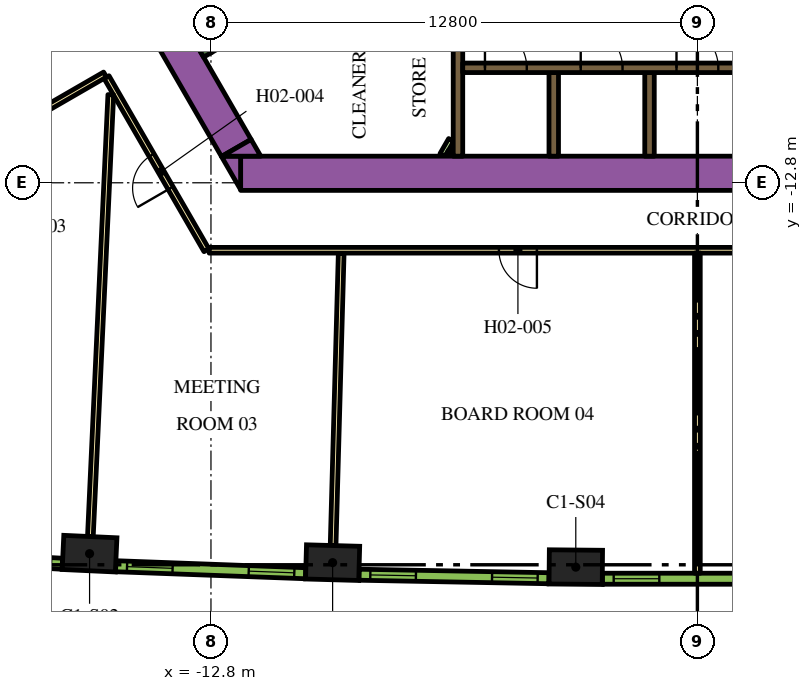
"""IFC4 building model, lengths in metres.
Left out: names, types, materials, properties, quantities, classifications, styles, units other than length and angle.
Written with IfcOpenShell. Run it as: python <this file> out.ifc"""

import sys

from ifc_helpers import new_model, si_unit, direction, frame, frame_2d, origin, origin_2d, place, context, subcontext, project, spatial, polyline, rectangle, outline, extrude, element, fill, save


model = new_model("IFC4")
c1 = context("Model", 3, precision=1e-05, world=origin(), true_north=direction((0.0, 1.0)))
c2 = subcontext(c1, "Body", "Model", "MODEL_VIEW")
j1 = project(units=[si_unit("LENGTHUNIT", "METRE"), si_unit("PLANEANGLEUNIT", "RADIAN")], contexts=[c1])
p1 = place(None, origin())
s1 = spatial("IfcSite", under=j1, at=p1, CompositionType="ELEMENT")
p2 = place(p1, origin())
s2 = spatial("IfcBuilding", under=s1, at=p2, CompositionType="ELEMENT")
p3 = place(p2, frame((0.0, 0.0, 43.2)))
s3 = spatial("IfcBuildingStorey", under=s2, at=p3, CompositionType="ELEMENT", Elevation=43.2)
for number, where, z_axis, x_axis in (
    (1, (-15.994, -22.558, 0.0), (0.0, 0.0, 1.0), (0.999, -0.046, 0.0)),
    (2, (-9.599, -22.795, 0.0), (0.0, 0.0, 1.0), (1.0, -0.028, 0.0)),
    (3, (-3.2, -22.913, 0.0), (0.0, 0.0, 1.0), (1.0, -0.009, 0.0)),
):
    element("IfcColumn", number, at=place(p3, frame(where, z_axis=z_axis, x_axis=x_axis)), inside=s3, PredefinedType="COLUMN", context=c2, shape_type="SweptSolid", body=[
        extrude(rectangle(XDim=1.4, YDim=0.9, at=origin_2d()), origin(), (0.0, 0.0, 1.0), 3.9),
    ])
p4 = place(p3, frame((-12.019, -12.55, 0.0), z_axis=(0.0, 0.0, 1.0), x_axis=(1.0, 0.0, 0.0)))
e4 = element("IfcWall", 4, at=p4, inside=s3, PredefinedType="SOLIDWALL", context=c2, shape_type="SweptSolid", body=[
    extrude(rectangle(XDim=22.083, YDim=0.9, at=frame_2d((11.042, 0.0))), origin(), (0.0, 0.0, 1.0), 3.9),
])
p5 = place(p3, origin())
e5 = element("IfcWall", 5, at=p5, inside=s3, PredefinedType="SOLIDWALL", context=c2, shape_type="SweptSolid", body=[
    extrude(outline(polyline([(-12.529, -12.1), (-12.021, -12.1), (-12.021, -12.98), (-12.529, -12.1)])), origin(), (0.0, 0.0, 1.0), 3.9),
])
p6 = place(p3, frame((-12.134, -11.883, 0.0), z_axis=(0.0, 0.0, 1.0), x_axis=(-0.500005339912, 0.866022320763, 0.0)))
e6 = element("IfcWall", 6, at=p6, inside=s3, PredefinedType="SOLIDWALL", context=c2, shape_type="SweptSolid", body=[
    extrude(rectangle(XDim=9.488, YDim=0.9, at=frame_2d((4.744, 0.0))), origin(), (0.0, 0.0, 1.0), 3.9),
])
e7 = element("IfcWall", 7, at=p5, inside=s3, PredefinedType="SOLIDWALL", context=c2, shape_type="SweptSolid", body=[
    extrude(outline(polyline([(-11.489, -12.1), (-12.505, -12.1), (-11.743, -11.66), (-11.489, -12.1)])), origin(), (0.0, 0.0, 1.0), 3.9),
])
p7 = place(p3, frame((-12.885, -9.431, 0.0), z_axis=(0.0, 0.0, 1.0), x_axis=(-0.500020560727, 0.866013532718, 0.0)))
e8 = element("IfcWall", 8, at=p7, inside=s3, PredefinedType="SOLIDWALL", context=c2, shape_type="SweptSolid", body=[
    extrude(rectangle(XDim=3.45, YDim=0.25, at=frame_2d((1.725, 0.0))), origin(), (0.0, 0.0, 1.0), 3.9),
])
p8 = place(p3, frame((-12.84, -9.261, 0.0), z_axis=(0.0, 0.0, 1.0), x_axis=(0.866016039709, 0.500016218704, 0.0)))
e9 = element("IfcWall", 9, at=p8, inside=s3, PredefinedType="SOLIDWALL", context=c2, shape_type="SweptSolid", body=[
    extrude(rectangle(XDim=7.05, YDim=0.25, at=frame_2d((3.525, 0.0))), origin(), (0.0, 0.0, 1.0), 3.9),
])
p9 = place(p3, frame((-3.78, -12.1, 0.0), z_axis=(0.0, 0.0, 1.0), x_axis=(0.0, 1.0, 0.0)))
e10 = element("IfcWall", 10, at=p9, inside=s3, PredefinedType="SOLIDWALL", context=c2, shape_type="SweptSolid", body=[
    extrude(rectangle(XDim=2.2, YDim=0.25, at=frame_2d((1.1, 0.0))), origin(), (0.0, 0.0, 1.0), 3.9),
])
p10 = place(p3, frame((-6.3, -12.1, 0.0), z_axis=(0.0, 0.0, 1.0), x_axis=(0.0, 1.0, 0.0)))
e11 = element("IfcWall", 11, at=p10, inside=s3, PredefinedType="SOLIDWALL", context=c2, shape_type="SweptSolid", body=[
    extrude(rectangle(XDim=3.146, YDim=0.25, at=frame_2d((1.573, 0.0))), origin(), (0.0, 0.0, 1.0), 3.9),
])
p11 = place(p3, frame((-1.26, -12.1, 0.0), z_axis=(0.0, 0.0, 1.0), x_axis=(0.0, 1.0, 0.0)))
e12 = element("IfcWall", 12, at=p11, inside=s3, PredefinedType="SOLIDWALL", context=c2, shape_type="SweptSolid", body=[
    extrude(rectangle(XDim=2.2, YDim=0.25, at=frame_2d((1.1, 0.0))), origin(), (0.0, 0.0, 1.0), 3.9),
])
p12 = place(p3, frame((-6.708, -12.068, 0.0), z_axis=(0.0, 0.0, 1.0), x_axis=(0.500000789788, 0.8660249478, 0.0)))
e13 = element("IfcWall", 13, at=p12, inside=s3, PredefinedType="PARTITIONING", context=c2, shape_type="SweptSolid", body=[
    extrude(rectangle(XDim=0.456, YDim=0.15, at=frame_2d((0.228, 0.0))), origin(), (0.0, 0.0, 1.0), 2.75),
])
p13 = place(p3, frame((-6.534, -12.068, 0.0), z_axis=(0.0, 0.0, 1.0), x_axis=(0.500240224089, 0.865886665912, 0.0)))
e14 = element("IfcWall", 14, at=p13, inside=s3, PredefinedType="PARTITIONING", context=c2, shape_type="SweptSolid", body=[
    extrude(rectangle(XDim=0.109, YDim=0.15, at=frame_2d((0.054, 0.0))), origin(), (0.0, 0.0, 1.0), 2.75),
])
p14 = place(p3, frame((-6.175, -9.775, 0.0), z_axis=(0.0, 0.0, 1.0), x_axis=(1.0, 0.0, 0.0)))
e15 = element("IfcWall", 15, at=p14, inside=s3, PredefinedType="SOLIDWALL", context=c2, shape_type="SweptSolid", body=[
    extrude(rectangle(XDim=12.35, YDim=0.25, at=frame_2d((6.175, 0.0))), origin(), (0.0, 0.0, 1.0), 3.9),
])
p15 = place(p14, frame((0.585, 0.0, 0.0)))
e16 = element("IfcOpeningElement", 16, at=p15, cuts=e15, PredefinedType="OPENING", context=c2, shape_type="SweptSolid", body=[
    extrude(rectangle(XDim=1.1, YDim=2.1, at=frame_2d((0.55, 1.05))), frame((0.0, 0.135, 0.0), z_axis=(0.0, -1.0, 0.0), x_axis=(1.0, 0.0, 0.0)), (0.0, 0.0, 1.0), 0.27),
])
p16 = place(p14, frame((3.105, 0.0, 0.0)))
e17 = element("IfcOpeningElement", 17, at=p16, cuts=e15, PredefinedType="OPENING", context=c2, shape_type="SweptSolid", body=[
    extrude(rectangle(XDim=1.1, YDim=2.1, at=frame_2d((0.55, 1.05))), frame((0.0, 0.135, 0.0), z_axis=(0.0, -1.0, 0.0), x_axis=(1.0, 0.0, 0.0)), (0.0, 0.0, 1.0), 0.27),
])
p17 = place(p14, frame((5.625, 0.0, 0.0)))
e18 = element("IfcOpeningElement", 18, at=p17, cuts=e15, PredefinedType="OPENING", context=c2, shape_type="SweptSolid", body=[
    extrude(rectangle(XDim=1.1, YDim=2.1, at=frame_2d((0.55, 1.05))), frame((0.0, 0.135, 0.0), z_axis=(0.0, -1.0, 0.0), x_axis=(1.0, 0.0, 0.0)), (0.0, 0.0, 1.0), 0.27),
])
p18 = place(p14, frame((8.145, 0.0, 0.0)))
e19 = element("IfcOpeningElement", 19, at=p18, cuts=e15, PredefinedType="OPENING", context=c2, shape_type="SweptSolid", body=[
    extrude(rectangle(XDim=1.1, YDim=2.1, at=frame_2d((0.55, 1.05))), frame((0.0, 0.135, 0.0), z_axis=(0.0, -1.0, 0.0), x_axis=(1.0, 0.0, 0.0)), (0.0, 0.0, 1.0), 0.27),
])
p19 = place(p14, frame((10.665, 0.0, 0.0)))
e20 = element("IfcOpeningElement", 20, at=p19, cuts=e15, PredefinedType="OPENING", context=c2, shape_type="SweptSolid", body=[
    extrude(rectangle(XDim=1.1, YDim=2.1, at=frame_2d((0.55, 1.05))), frame((0.0, 0.135, 0.0), z_axis=(0.0, -1.0, 0.0), x_axis=(1.0, 0.0, 0.0)), (0.0, 0.0, 1.0), 0.27),
])
p20 = place(p3, frame((-30.463, -16.635, 0.0), z_axis=(0.0, 0.0, 1.0), x_axis=(0.866022394896, 0.500005211512, 0.0)))
e21 = element("IfcWall", 21, at=p20, inside=s3, PredefinedType="PARTITIONING", context=c2, shape_type="SweptSolid", body=[
    extrude(rectangle(XDim=16.144, YDim=0.15, at=frame_2d((8.072, 0.0))), origin(), (0.0, 0.0, 1.0), 2.75),
])
p21 = place(p20, frame((13.948, 0.0, 0.0)))
e22 = element("IfcOpeningElement", 22, at=p21, cuts=e21, PredefinedType="OPENING", context=c2, shape_type="SweptSolid", body=[
    extrude(rectangle(XDim=0.9, YDim=2.1, at=frame_2d((0.45, 1.05))), frame((0.0, 0.085, 0.0), z_axis=(0.0, -1.0, 0.0), x_axis=(1.0, 0.0, 0.0)), (0.0, 0.0, 1.0), 0.17),
])
p22 = place(p20, frame((10.329, 0.0, 0.0)))
e23 = element("IfcOpeningElement", 23, at=p22, cuts=e21, PredefinedType="OPENING", context=c2, shape_type="SweptSolid", body=[
    extrude(rectangle(XDim=0.9, YDim=2.1, at=frame_2d((0.45, 1.05))), frame((0.0, 0.085, 0.0), z_axis=(0.0, -1.0, 0.0), x_axis=(1.0, 0.0, 0.0)), (0.0, 0.0, 1.0), 0.17),
])
p23 = place(p20, frame((7.274, 0.0, 0.0)))
e24 = element("IfcOpeningElement", 24, at=p23, cuts=e21, PredefinedType="OPENING", context=c2, shape_type="SweptSolid", body=[
    extrude(rectangle(XDim=1.0, YDim=2.1, at=frame_2d((0.5, 1.05))), frame((0.0, 0.085, 0.0), z_axis=(0.0, -1.0, 0.0), x_axis=(1.0, 0.0, 0.0)), (0.0, 0.0, 1.0), 0.17),
])
p24 = place(p3, frame((-15.587, -9.952, 0.0), z_axis=(0.0, 0.0, 1.0), x_axis=(-0.866022197818, -0.500005552856, 0.0)))
e25 = element("IfcWall", 25, at=p24, inside=s3, PredefinedType="PARTITIONING", context=c2, shape_type="SweptSolid", body=[
    extrude(rectangle(XDim=16.224, YDim=0.15, at=frame_2d((8.112, 0.0))), origin(), (0.0, 0.0, 1.0), 2.75),
])
p25 = place(p24, frame((7.949, 0.0, 0.0)))
e26 = element("IfcOpeningElement", 26, at=p25, cuts=e25, PredefinedType="OPENING", context=c2, shape_type="SweptSolid", body=[
    extrude(rectangle(XDim=1.0, YDim=2.1, at=frame_2d((0.5, 1.05))), frame((0.0, 0.085, 0.0), z_axis=(0.0, -1.0, 0.0), x_axis=(1.0, 0.0, 0.0)), (0.0, 0.0, 1.0), 0.17),
])
p26 = place(p24, frame((3.172, 0.0, 0.0)))
e27 = element("IfcOpeningElement", 27, at=p26, cuts=e25, PredefinedType="OPENING", context=c2, shape_type="SweptSolid", body=[
    extrude(rectangle(XDim=1.0, YDim=2.1, at=frame_2d((0.5, 1.05))), frame((0.0, 0.085, 0.0), z_axis=(0.0, -1.0, 0.0), x_axis=(1.0, 0.0, 0.0)), (0.0, 0.0, 1.0), 0.17),
])
p27 = place(p3, frame((-12.918, -14.575, 0.0), z_axis=(0.0, 0.0, 1.0), x_axis=(-0.500009150678, 0.866020120573, 0.0)))
e28 = element("IfcWall", 28, at=p27, inside=s3, PredefinedType="PARTITIONING", context=c2, shape_type="SweptSolid", body=[
    extrude(rectangle(XDim=5.258, YDim=0.15, at=frame_2d((2.629, 0.0))), origin(), (0.0, 0.0, 1.0), 2.75),
])
p28 = place(p27, frame((1.888, 0.0, 0.0)))
e29 = element("IfcOpeningElement", 29, at=p28, cuts=e28, PredefinedType="OPENING", context=c2, shape_type="SweptSolid", body=[
    extrude(rectangle(XDim=1.0, YDim=2.1, at=frame_2d((0.5, 1.05))), frame((0.0, 0.085, 0.0), z_axis=(0.0, -1.0, 0.0), x_axis=(1.0, 0.0, 0.0)), (0.0, 0.0, 1.0), 0.17),
])
p29 = place(p3, frame((12.918, -14.575, 0.0), z_axis=(0.0, 0.0, 1.0), x_axis=(-1.0, 0.0, 0.0)))
e30 = element("IfcWall", 30, at=p29, inside=s3, PredefinedType="PARTITIONING", context=c2, shape_type="SweptSolid", body=[
    extrude(rectangle(XDim=25.766, YDim=0.15, at=frame_2d((12.883, 0.0))), origin(), (0.0, 0.0, 1.0), 2.75),
])
p30 = place(p29, frame((17.141, 0.0, 0.0)))
e31 = element("IfcOpeningElement", 31, at=p30, cuts=e30, PredefinedType="OPENING", context=c2, shape_type="SweptSolid", body=[
    extrude(rectangle(XDim=1.0, YDim=2.1, at=frame_2d((0.5, 1.05))), frame((0.0, 0.085, 0.0), z_axis=(0.0, -1.0, 0.0), x_axis=(1.0, 0.0, 0.0)), (0.0, 0.0, 1.0), 0.17),
])
p31 = place(p29, frame((9.259, 0.0, 0.0)))
e32 = element("IfcOpeningElement", 32, at=p31, cuts=e30, PredefinedType="OPENING", context=c2, shape_type="SweptSolid", body=[
    extrude(rectangle(XDim=1.0, YDim=2.1, at=frame_2d((0.5, 1.05))), frame((0.0, 0.085, 0.0), z_axis=(0.0, -1.0, 0.0), x_axis=(1.0, 0.0, 0.0)), (0.0, 0.0, 1.0), 0.17),
])
p32 = place(p29, frame((3.044, 0.0, 0.0)))
e33 = element("IfcOpeningElement", 33, at=p32, cuts=e30, PredefinedType="OPENING", context=c2, shape_type="SweptSolid", body=[
    extrude(rectangle(XDim=1.0, YDim=2.1, at=frame_2d((0.5, 1.05))), frame((0.0, 0.085, 0.0), z_axis=(0.0, -1.0, 0.0), x_axis=(1.0, 0.0, 0.0)), (0.0, 0.0, 1.0), 0.17),
])
p33 = place(p3, frame((-15.973, -22.109, 0.0), z_axis=(0.0, 0.0, 1.0), x_axis=(0.046191717129, 0.998932592955, 0.0)))
e34 = element("IfcWall", 34, at=p33, inside=s3, PredefinedType="PARTITIONING", context=c2, shape_type="SweptSolid", body=[
    extrude(rectangle(XDim=11.638, YDim=0.15, at=frame_2d((5.819, 0.0))), origin(), (0.0, 0.0, 1.0), 2.75),
])
p34 = place(p3, frame((-9.586, -22.345, 0.0), z_axis=(0.0, 0.0, 1.0), x_axis=(0.027722115646, 0.999615668297, 0.0)))
e35 = element("IfcWall", 35, at=p34, inside=s3, PredefinedType="PARTITIONING", context=c2, shape_type="SweptSolid", body=[
    extrude(rectangle(XDim=7.688, YDim=0.15, at=frame_2d((3.844, 0.0))), origin(), (0.0, 0.0, 1.0), 2.75),
])
p35 = place(p3, frame((0.0, -23.073, 0.0), z_axis=(0.0, 0.0, 1.0), x_axis=(0.0, 1.0, 0.0)))
e36 = element("IfcWall", 36, at=p35, inside=s3, PredefinedType="PARTITIONING", context=c2, shape_type="SweptSolid", body=[
    extrude(rectangle(XDim=8.423, YDim=0.15, at=frame_2d((4.212, 0.0))), origin(), (0.0, 0.0, 1.0), 2.75),
])
p36 = place(p3, frame((-21.701, -22.547, 0.0), z_axis=(0.0, 0.0, 1.0), x_axis=(0.998464708705, -0.055391564976, 0.0)))
e37 = element("IfcWall", 37, at=p36, inside=s3, PredefinedType="SOLIDWALL", context=c2, shape_type="SweptSolid", body=[
    extrude(rectangle(XDim=4.998, YDim=0.29, at=frame_2d((2.499, 0.0))), origin(), (0.0, 0.0, 1.0), 3.65),
])
p37 = place(p36, frame((0.297, 0.0, 0.9)))
e38 = element("IfcOpeningElement", 38, at=p37, cuts=e37, PredefinedType="OPENING", context=c2, shape_type="SweptSolid", body=[
    extrude(rectangle(XDim=1.2, YDim=2.15, at=frame_2d((0.6, 1.075))), frame((0.0, 0.155, 0.0), z_axis=(0.0, -1.0, 0.0), x_axis=(1.0, 0.0, 0.0)), (0.0, 0.0, 1.0), 0.31),
])
p38 = place(p36, frame((3.501, 0.0, 0.9)))
e39 = element("IfcOpeningElement", 39, at=p38, cuts=e37, PredefinedType="OPENING", context=c2, shape_type="SweptSolid", body=[
    extrude(rectangle(XDim=1.2, YDim=2.15, at=frame_2d((0.6, 1.075))), frame((0.0, 0.155, 0.0), z_axis=(0.0, -1.0, 0.0), x_axis=(1.0, 0.0, 0.0)), (0.0, 0.0, 1.0), 0.31),
])
p39 = place(p3, frame((-15.305, -22.889, 0.0), z_axis=(0.0, 0.0, 1.0), x_axis=(0.999317974969, -0.036926750529, 0.0)))
e40 = element("IfcWall", 40, at=p39, inside=s3, PredefinedType="SOLIDWALL", context=c2, shape_type="SweptSolid", body=[
    extrude(rectangle(XDim=4.998, YDim=0.29, at=frame_2d((2.499, 0.0))), origin(), (0.0, 0.0, 1.0), 3.65),
])
p40 = place(p39, frame((0.297, 0.0, 0.9)))
e41 = element("IfcOpeningElement", 41, at=p40, cuts=e40, PredefinedType="OPENING", context=c2, shape_type="SweptSolid", body=[
    extrude(rectangle(XDim=1.2, YDim=2.15, at=frame_2d((0.6, 1.075))), frame((0.0, 0.155, 0.0), z_axis=(0.0, -1.0, 0.0), x_axis=(1.0, 0.0, 0.0)), (0.0, 0.0, 1.0), 0.31),
])
p41 = place(p39, frame((3.501, 0.0, 0.9)))
e42 = element("IfcOpeningElement", 42, at=p41, cuts=e40, PredefinedType="OPENING", context=c2, shape_type="SweptSolid", body=[
    extrude(rectangle(XDim=1.2, YDim=2.15, at=frame_2d((0.6, 1.075))), frame((0.0, 0.155, 0.0), z_axis=(0.0, -1.0, 0.0), x_axis=(1.0, 0.0, 0.0)), (0.0, 0.0, 1.0), 0.31),
])
p42 = place(p3, frame((-8.904, -23.113, 0.0), z_axis=(0.0, 0.0, 1.0), x_axis=(0.999829529479, -0.018463801951, 0.0)))
e43 = element("IfcWall", 43, at=p42, inside=s3, PredefinedType="SOLIDWALL", context=c2, shape_type="SweptSolid", body=[
    extrude(rectangle(XDim=4.998, YDim=0.29, at=frame_2d((2.499, 0.0))), origin(), (0.0, 0.0, 1.0), 3.65),
])
p43 = place(p42, frame((0.297, 0.0, 0.9)))
e44 = element("IfcOpeningElement", 44, at=p43, cuts=e43, PredefinedType="OPENING", context=c2, shape_type="SweptSolid", body=[
    extrude(rectangle(XDim=1.2, YDim=2.15, at=frame_2d((0.6, 1.075))), frame((0.0, 0.155, 0.0), z_axis=(0.0, -1.0, 0.0), x_axis=(1.0, 0.0, 0.0)), (0.0, 0.0, 1.0), 0.31),
])
p44 = place(p42, frame((3.501, 0.0, 0.9)))
e45 = element("IfcOpeningElement", 45, at=p44, cuts=e43, PredefinedType="OPENING", context=c2, shape_type="SweptSolid", body=[
    extrude(rectangle(XDim=1.2, YDim=2.15, at=frame_2d((0.6, 1.075))), frame((0.0, 0.155, 0.0), z_axis=(0.0, -1.0, 0.0), x_axis=(1.0, 0.0, 0.0)), (0.0, 0.0, 1.0), 0.31),
])
p45 = place(p3, frame((-2.499, -23.218, 0.0), z_axis=(0.0, 0.0, 1.0), x_axis=(1.0, 0.0, 0.0)))
e46 = element("IfcWall", 46, at=p45, inside=s3, PredefinedType="SOLIDWALL", context=c2, shape_type="SweptSolid", body=[
    extrude(rectangle(XDim=4.998, YDim=0.29, at=frame_2d((2.499, 0.0))), origin(), (0.0, 0.0, 1.0), 3.65),
])
p46 = place(p45, frame((0.297, 0.0, 0.9)))
e47 = element("IfcOpeningElement", 47, at=p46, cuts=e46, PredefinedType="OPENING", context=c2, shape_type="SweptSolid", body=[
    extrude(rectangle(XDim=1.2, YDim=2.15, at=frame_2d((0.6, 1.075))), frame((0.0, 0.155, 0.0), z_axis=(0.0, -1.0, 0.0), x_axis=(1.0, 0.0, 0.0)), (0.0, 0.0, 1.0), 0.31),
])
p47 = place(p45, frame((3.501, 0.0, 0.9)))
e48 = element("IfcOpeningElement", 48, at=p47, cuts=e46, PredefinedType="OPENING", context=c2, shape_type="SweptSolid", body=[
    extrude(rectangle(XDim=1.2, YDim=2.15, at=frame_2d((0.6, 1.075))), frame((0.0, 0.155, 0.0), z_axis=(0.0, -1.0, 0.0), x_axis=(1.0, 0.0, 0.0)), (0.0, 0.0, 1.0), 0.31),
])
p48 = place(p15, origin())
e49 = element("IfcDoor", 49, at=p48, inside=s3, OperationType="DOUBLE_DOOR_SLIDING", PredefinedType="DOOR", context=c2, shape_type="SweptSolid", body=[
    extrude(rectangle(XDim=1.1, YDim=2.1, at=frame_2d((0.55, 1.05))), frame((0.0, 0.025, 0.0), z_axis=(0.0, -1.0, 0.0), x_axis=(1.0, 0.0, 0.0)), (0.0, 0.0, 1.0), 0.05),
])
fill(e16, e49)
p49 = place(p16, origin())
e50 = element("IfcDoor", 50, at=p49, inside=s3, OperationType="DOUBLE_DOOR_SLIDING", PredefinedType="DOOR", context=c2, shape_type="SweptSolid", body=[
    extrude(rectangle(XDim=1.1, YDim=2.1, at=frame_2d((0.55, 1.05))), frame((0.0, 0.025, 0.0), z_axis=(0.0, -1.0, 0.0), x_axis=(1.0, 0.0, 0.0)), (0.0, 0.0, 1.0), 0.05),
])
fill(e17, e50)
p50 = place(p17, origin())
e51 = element("IfcDoor", 51, at=p50, inside=s3, OperationType="DOUBLE_DOOR_SLIDING", PredefinedType="DOOR", context=c2, shape_type="SweptSolid", body=[
    extrude(rectangle(XDim=1.1, YDim=2.1, at=frame_2d((0.55, 1.05))), frame((0.0, 0.025, 0.0), z_axis=(0.0, -1.0, 0.0), x_axis=(1.0, 0.0, 0.0)), (0.0, 0.0, 1.0), 0.05),
])
fill(e18, e51)
p51 = place(p28, origin())
e52 = element("IfcDoor", 52, at=p51, inside=s3, OperationType="SINGLE_SWING_LEFT", PredefinedType="DOOR", context=c2, shape_type="SweptSolid", body=[
    extrude(rectangle(XDim=1.0, YDim=2.1, at=frame_2d((0.5, 1.05))), frame((0.0, 0.025, 0.0), z_axis=(0.0, -1.0, 0.0), x_axis=(1.0, 0.0, 0.0)), (0.0, 0.0, 1.0), 0.05),
])
fill(e29, e52)
p52 = place(p30, origin())
e53 = element("IfcDoor", 53, at=p52, inside=s3, OperationType="SINGLE_SWING_RIGHT", PredefinedType="DOOR", context=c2, shape_type="SweptSolid", body=[
    extrude(rectangle(XDim=1.0, YDim=2.1, at=frame_2d((0.5, 1.05))), frame((0.0, 0.025, 0.0), z_axis=(0.0, -1.0, 0.0), x_axis=(1.0, 0.0, 0.0)), (0.0, 0.0, 1.0), 0.05),
])
fill(e31, e53)
p53 = place(p40, origin())
e54 = element("IfcWindow", 54, at=p53, inside=s3, PartitioningType="DOUBLE_PANEL_VERTICAL", PredefinedType="WINDOW", context=c2, shape_type="SweptSolid", body=[
    extrude(rectangle(XDim=1.2, YDim=2.15, at=frame_2d((0.6, 1.075))), frame((0.0, 0.015, 0.0), z_axis=(0.0, -1.0, 0.0), x_axis=(1.0, 0.0, 0.0)), (0.0, 0.0, 1.0), 0.06),
])
fill(e41, e54)
p54 = place(p41, origin())
e55 = element("IfcWindow", 55, at=p54, inside=s3, PartitioningType="DOUBLE_PANEL_VERTICAL", PredefinedType="WINDOW", context=c2, shape_type="SweptSolid", body=[
    extrude(rectangle(XDim=1.2, YDim=2.15, at=frame_2d((0.6, 1.075))), frame((0.0, 0.015, 0.0), z_axis=(0.0, -1.0, 0.0), x_axis=(1.0, 0.0, 0.0)), (0.0, 0.0, 1.0), 0.06),
])
fill(e42, e55)
p55 = place(p43, origin())
e56 = element("IfcWindow", 56, at=p55, inside=s3, PartitioningType="DOUBLE_PANEL_VERTICAL", PredefinedType="WINDOW", context=c2, shape_type="SweptSolid", body=[
    extrude(rectangle(XDim=1.2, YDim=2.15, at=frame_2d((0.6, 1.075))), frame((0.0, 0.015, 0.0), z_axis=(0.0, -1.0, 0.0), x_axis=(1.0, 0.0, 0.0)), (0.0, 0.0, 1.0), 0.06),
])
fill(e44, e56)
p56 = place(p44, origin())
e57 = element("IfcWindow", 57, at=p56, inside=s3, PartitioningType="DOUBLE_PANEL_VERTICAL", PredefinedType="WINDOW", context=c2, shape_type="SweptSolid", body=[
    extrude(rectangle(XDim=1.2, YDim=2.15, at=frame_2d((0.6, 1.075))), frame((0.0, 0.015, 0.0), z_axis=(0.0, -1.0, 0.0), x_axis=(1.0, 0.0, 0.0)), (0.0, 0.0, 1.0), 0.06),
])
fill(e45, e57)
p57 = place(p46, origin())
e58 = element("IfcWindow", 58, at=p57, inside=s3, PartitioningType="DOUBLE_PANEL_VERTICAL", PredefinedType="WINDOW", context=c2, shape_type="SweptSolid", body=[
    extrude(rectangle(XDim=1.2, YDim=2.15, at=frame_2d((0.6, 1.075))), frame((0.0, 0.015, 0.0), z_axis=(0.0, -1.0, 0.0), x_axis=(1.0, 0.0, 0.0)), (0.0, 0.0, 1.0), 0.06),
])
fill(e47, e58)
save(model, sys.argv[1])
